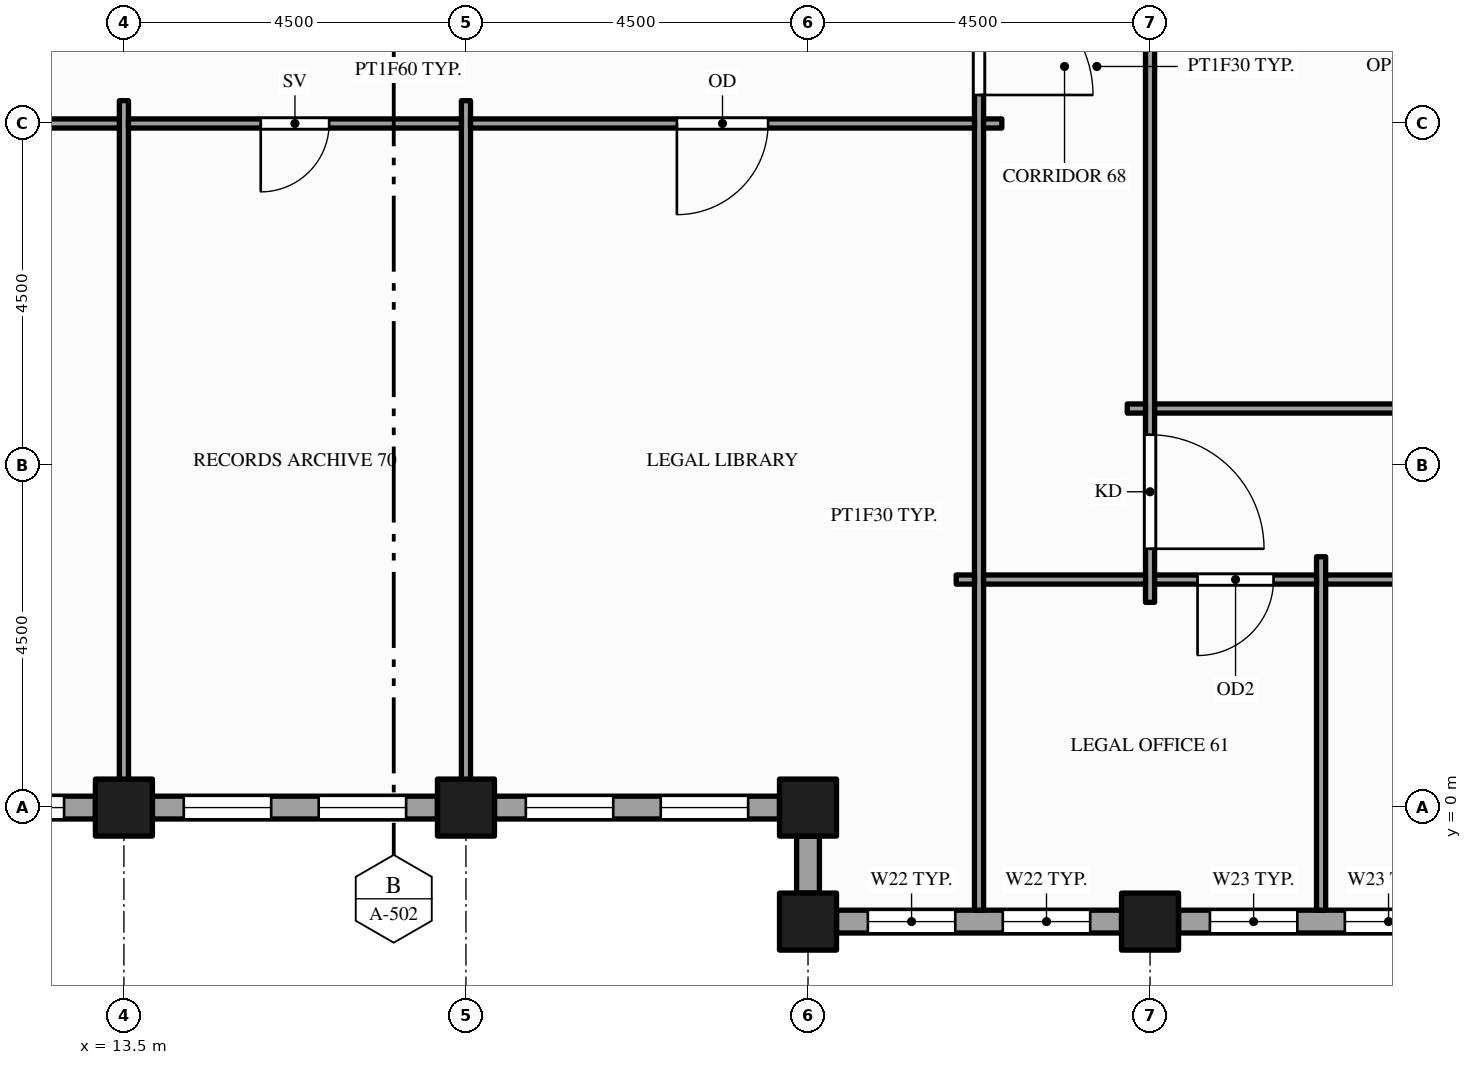
"""IFC4 building model, lengths in metres.
Left out: names, types, materials, properties, quantities, classifications, styles, units other than length and angle.
Written with IfcOpenShell. Run it as: python <this file> out.ifc"""

import sys

from ifc_helpers import new_model, si_unit, direction, frame, frame_2d, origin, origin_2d, place, context, subcontext, project, spatial, rectangle, hollow_rectangle, extrude, element, fill, save


model = new_model("IFC4")
c1 = context("Model", 3, precision=1e-05, world=origin(), true_north=direction((0.0, 1.0)))
c2 = subcontext(c1, "Body", "Model", "MODEL_VIEW")
j1 = project(units=[si_unit("LENGTHUNIT", "METRE"), si_unit("PLANEANGLEUNIT", "RADIAN")], contexts=[c1])
p1 = place(None, origin())
s1 = spatial("IfcSite", under=j1, at=p1, CompositionType="ELEMENT")
p2 = place(p1, origin())
s2 = spatial("IfcBuilding", under=s1, at=p2, CompositionType="ELEMENT")
p3 = place(p2, frame((0.0, 0.0, 199.0)))
s3 = spatial("IfcBuildingStorey", under=s2, at=p3, CompositionType="ELEMENT", Elevation=199.0)
for number, where, z_axis, x_axis in (
    (1, (13.5, 0.0, -0.15), (0.0, 0.0, 1.0), (1.0, 0.0, 0.0)),
    (2, (18.0, 0.0, -0.15), (0.0, 0.0, 1.0), (1.0, 0.0, 0.0)),
    (3, (22.5, -1.5, -0.15), (0.0, 0.0, 1.0), (1.0, 0.0, 0.0)),
    (4, (22.5, 0.0, -0.15), (0.0, 0.0, 1.0), (1.0, 0.0, 0.0)),
    (5, (27.0, -1.5, -0.15), (0.0, 0.0, 1.0), (1.0, 0.0, 0.0)),
):
    element("IfcColumn", number, at=place(p3, frame(where, z_axis=z_axis, x_axis=x_axis)), inside=s3, PredefinedType="COLUMN", context=c2, shape_type="SweptSolid", body=[
        extrude(hollow_rectangle(XDim=0.75, YDim=0.75, WallThickness=0.036, at=origin_2d()), origin(), (0.0, 0.0, 1.0), 4.0),
    ])
p4 = place(p3, frame((22.875, -1.5, 0.0), z_axis=(0.0, 0.0, 1.0), x_axis=(1.0, 0.0, 0.0)))
e6 = element("IfcWall", 6, at=p4, inside=s3, PredefinedType="STANDARD", context=c2, shape_type="SweptSolid", body=[
    extrude(rectangle(XDim=3.75, YDim=0.3, at=frame_2d((1.875, 0.0))), origin(), (0.0, 0.0, 1.0), 2.76),
])
p5 = place(p4, frame((0.413, 0.0, 0.9)))
e7 = element("IfcOpeningElement", 7, at=p5, cuts=e6, PredefinedType="OPENING", context=c2, shape_type="SweptSolid", body=[
    extrude(rectangle(XDim=1.15, YDim=1.5, at=frame_2d((0.575, 0.75))), frame((0.0, 0.16, 0.0), z_axis=(0.0, -1.0, 0.0), x_axis=(1.0, 0.0, 0.0)), (0.0, 0.0, 1.0), 0.32),
])
p6 = place(p4, frame((2.188, 0.0, 0.9)))
e8 = element("IfcOpeningElement", 8, at=p6, cuts=e6, PredefinedType="OPENING", context=c2, shape_type="SweptSolid", body=[
    extrude(rectangle(XDim=1.15, YDim=1.5, at=frame_2d((0.575, 0.75))), frame((0.0, 0.16, 0.0), z_axis=(0.0, -1.0, 0.0), x_axis=(1.0, 0.0, 0.0)), (0.0, 0.0, 1.0), 0.32),
])
p7 = place(p3, frame((27.375, -1.5, 0.0), z_axis=(0.0, 0.0, 1.0), x_axis=(1.0, 0.0, 0.0)))
e9 = element("IfcWall", 9, at=p7, inside=s3, PredefinedType="STANDARD", context=c2, shape_type="SweptSolid", body=[
    extrude(rectangle(XDim=3.75, YDim=0.3, at=frame_2d((1.875, 0.0))), origin(), (0.0, 0.0, 1.0), 2.87),
])
p8 = place(p7, frame((0.413, 0.0, 0.9)))
e10 = element("IfcOpeningElement", 10, at=p8, cuts=e9, PredefinedType="OPENING", context=c2, shape_type="SweptSolid", body=[
    extrude(rectangle(XDim=1.15, YDim=1.75, at=frame_2d((0.575, 0.875))), frame((0.0, 0.16, 0.0), z_axis=(0.0, -1.0, 0.0), x_axis=(1.0, 0.0, 0.0)), (0.0, 0.0, 1.0), 0.32),
])
p9 = place(p7, frame((2.188, 0.0, 0.9)))
e11 = element("IfcOpeningElement", 11, at=p9, cuts=e9, PredefinedType="OPENING", context=c2, shape_type="SweptSolid", body=[
    extrude(rectangle(XDim=1.15, YDim=1.75, at=frame_2d((0.575, 0.875))), frame((0.0, 0.16, 0.0), z_axis=(0.0, -1.0, 0.0), x_axis=(1.0, 0.0, 0.0)), (0.0, 0.0, 1.0), 0.32),
])
p10 = place(p3, frame((9.375, 0.0, 0.0), z_axis=(0.0, 0.0, 1.0), x_axis=(1.0, 0.0, 0.0)))
e12 = element("IfcWall", 12, at=p10, inside=s3, PredefinedType="STANDARD", context=c2, shape_type="SweptSolid", body=[
    extrude(rectangle(XDim=3.75, YDim=0.3, at=frame_2d((1.875, 0.0))), origin(), (0.0, 0.0, 1.0), 2.87),
])
p11 = place(p10, frame((0.413, 0.0, 0.9)))
e13 = element("IfcOpeningElement", 13, at=p11, cuts=e12, PredefinedType="OPENING", context=c2, shape_type="SweptSolid", body=[
    extrude(rectangle(XDim=1.15, YDim=1.75, at=frame_2d((0.575, 0.875))), frame((0.0, 0.16, 0.0), z_axis=(0.0, -1.0, 0.0), x_axis=(1.0, 0.0, 0.0)), (0.0, 0.0, 1.0), 0.32),
])
p12 = place(p10, frame((2.188, 0.0, 0.9)))
e14 = element("IfcOpeningElement", 14, at=p12, cuts=e12, PredefinedType="OPENING", context=c2, shape_type="SweptSolid", body=[
    extrude(rectangle(XDim=1.15, YDim=1.75, at=frame_2d((0.575, 0.875))), frame((0.0, 0.16, 0.0), z_axis=(0.0, -1.0, 0.0), x_axis=(1.0, 0.0, 0.0)), (0.0, 0.0, 1.0), 0.32),
])
p13 = place(p3, frame((13.875, 0.0, 0.0), z_axis=(0.0, 0.0, 1.0), x_axis=(1.0, 0.0, 0.0)))
e15 = element("IfcWall", 15, at=p13, inside=s3, PredefinedType="STANDARD", context=c2, shape_type="SweptSolid", body=[
    extrude(rectangle(XDim=3.75, YDim=0.3, at=frame_2d((1.875, 0.0))), origin(), (0.0, 0.0, 1.0), 2.87),
])
p14 = place(p13, frame((0.413, 0.0, 0.9)))
e16 = element("IfcOpeningElement", 16, at=p14, cuts=e15, PredefinedType="OPENING", context=c2, shape_type="SweptSolid", body=[
    extrude(rectangle(XDim=1.15, YDim=1.75, at=frame_2d((0.575, 0.875))), frame((0.0, 0.16, 0.0), z_axis=(0.0, -1.0, 0.0), x_axis=(1.0, 0.0, 0.0)), (0.0, 0.0, 1.0), 0.32),
])
p15 = place(p13, frame((2.188, 0.0, 0.9)))
e17 = element("IfcOpeningElement", 17, at=p15, cuts=e15, PredefinedType="OPENING", context=c2, shape_type="SweptSolid", body=[
    extrude(rectangle(XDim=1.15, YDim=1.75, at=frame_2d((0.575, 0.875))), frame((0.0, 0.16, 0.0), z_axis=(0.0, -1.0, 0.0), x_axis=(1.0, 0.0, 0.0)), (0.0, 0.0, 1.0), 0.32),
])
p16 = place(p3, frame((18.375, 0.0, 0.0), z_axis=(0.0, 0.0, 1.0), x_axis=(1.0, 0.0, 0.0)))
e18 = element("IfcWall", 18, at=p16, inside=s3, PredefinedType="STANDARD", context=c2, shape_type="SweptSolid", body=[
    extrude(rectangle(XDim=3.75, YDim=0.3, at=frame_2d((1.875, 0.0))), origin(), (0.0, 0.0, 1.0), 2.87),
])
p17 = place(p16, frame((0.413, 0.0, 0.9)))
e19 = element("IfcOpeningElement", 19, at=p17, cuts=e18, PredefinedType="OPENING", context=c2, shape_type="SweptSolid", body=[
    extrude(rectangle(XDim=1.15, YDim=1.75, at=frame_2d((0.575, 0.875))), frame((0.0, 0.16, 0.0), z_axis=(0.0, -1.0, 0.0), x_axis=(1.0, 0.0, 0.0)), (0.0, 0.0, 1.0), 0.32),
])
p18 = place(p16, frame((2.188, 0.0, 0.9)))
e20 = element("IfcOpeningElement", 20, at=p18, cuts=e18, PredefinedType="OPENING", context=c2, shape_type="SweptSolid", body=[
    extrude(rectangle(XDim=1.15, YDim=1.75, at=frame_2d((0.575, 0.875))), frame((0.0, 0.16, 0.0), z_axis=(0.0, -1.0, 0.0), x_axis=(1.0, 0.0, 0.0)), (0.0, 0.0, 1.0), 0.32),
])
p19 = place(p3, frame((22.5, -0.375, 0.0), z_axis=(0.0, 0.0, 1.0), x_axis=(0.0, -1.0, 0.0)))
e21 = element("IfcWall", 21, at=p19, inside=s3, PredefinedType="STANDARD", context=c2, shape_type="SweptSolid", body=[
    extrude(rectangle(XDim=0.75, YDim=0.3, at=frame_2d((0.375, 0.0))), origin(), (0.0, 0.0, 1.0), 3.157),
])
for number, where, z_axis, x_axis in (
    (22, (13.5, 0.15, 0.0), (0.0, 0.0, 1.0), (0.0, 1.0, 0.0)),
    (23, (18.0, 0.15, 0.0), (0.0, 0.0, 1.0), (0.0, 1.0, 0.0)),
):
    element("IfcWall", number, at=place(p3, frame(where, z_axis=z_axis, x_axis=x_axis)), inside=s3, PredefinedType="PARTITIONING", context=c2, shape_type="SweptSolid", body=[
        extrude(rectangle(XDim=9.15, YDim=0.12, at=frame_2d((4.575, 0.0))), origin(), (0.0, 0.0, 1.0), 2.87),
    ])
p20 = place(p3, frame((24.75, -1.35, 0.0), z_axis=(0.0, 0.0, 1.0), x_axis=(0.0, 1.0, 0.0)))
e24 = element("IfcWall", 24, at=p20, inside=s3, PredefinedType="PARTITIONING", context=c2, shape_type="SweptSolid", body=[
    extrude(rectangle(XDim=24.101, YDim=0.12, at=frame_2d((12.05, 0.0))), origin(), (0.0, 0.0, 1.0), 2.76),
])
p21 = place(p20, frame((10.725, 0.0, 0.0)))
e25 = element("IfcOpeningElement", 25, at=p21, cuts=e24, PredefinedType="OPENING", context=c2, shape_type="SweptSolid", body=[
    extrude(rectangle(XDim=1.5, YDim=2.1, at=frame_2d((0.75, 1.05))), frame((0.0, 0.07, 0.0), z_axis=(0.0, -1.0, 0.0), x_axis=(1.0, 0.0, 0.0)), (0.0, 0.0, 1.0), 0.14),
])
p22 = place(p20, frame((14.625, 0.0, 0.0)))
e26 = element("IfcOpeningElement", 26, at=p22, cuts=e24, PredefinedType="OPENING", context=c2, shape_type="SweptSolid", body=[
    extrude(rectangle(XDim=1.2, YDim=2.1, at=frame_2d((0.6, 1.05))), frame((0.0, 0.07, 0.0), z_axis=(0.0, -1.0, 0.0), x_axis=(1.0, 0.0, 0.0)), (0.0, 0.0, 1.0), 0.14),
])
p23 = place(p3, frame((27.0, 2.7, 0.0), z_axis=(0.0, 0.0, 1.0), x_axis=(0.0, 1.0, 0.0)))
e27 = element("IfcWall", 27, at=p23, inside=s3, PredefinedType="PARTITIONING", context=c2, shape_type="SweptSolid", body=[
    extrude(rectangle(XDim=14.1, YDim=0.12, at=frame_2d((7.05, 0.0))), origin(), (0.0, 0.0, 1.0), 2.87),
])
p24 = place(p23, frame((0.705, 0.0, 0.0)))
e28 = element("IfcOpeningElement", 28, at=p24, cuts=e27, PredefinedType="OPENING", context=c2, shape_type="SweptSolid", body=[
    extrude(rectangle(XDim=1.5, YDim=2.1, at=frame_2d((0.75, 1.05))), frame((0.0, 0.07, 0.0), z_axis=(0.0, -1.0, 0.0), x_axis=(1.0, 0.0, 0.0)), (0.0, 0.0, 1.0), 0.14),
])
p25 = place(p23, frame((11.895, 0.0, 0.0)))
e29 = element("IfcOpeningElement", 29, at=p25, cuts=e27, PredefinedType="OPENING", context=c2, shape_type="SweptSolid", body=[
    extrude(rectangle(XDim=1.5, YDim=2.1, at=frame_2d((0.75, 1.05))), frame((0.0, 0.07, 0.0), z_axis=(0.0, -1.0, 0.0), x_axis=(1.0, 0.0, 0.0)), (0.0, 0.0, 1.0), 0.14),
])
p26 = place(p3, frame((29.25, -1.35, 0.0), z_axis=(0.0, 0.0, 1.0), x_axis=(0.0, 1.0, 0.0)))
e30 = element("IfcWall", 30, at=p26, inside=s3, PredefinedType="PARTITIONING", context=c2, shape_type="SweptSolid", body=[
    extrude(rectangle(XDim=4.65, YDim=0.12, at=frame_2d((2.325, 0.0))), origin(), (0.0, 0.0, 1.0), 2.87),
])
p27 = place(p3, frame((24.45, 3.0, 0.0), z_axis=(0.0, 0.0, 1.0), x_axis=(1.0, 0.0, 0.0)))
e31 = element("IfcWall", 31, at=p27, inside=s3, PredefinedType="PARTITIONING", context=c2, shape_type="SweptSolid", body=[
    extrude(rectangle(XDim=0.24, YDim=0.12, at=frame_2d((0.12, 0.0))), origin(), (0.0, 0.0, 1.0), 2.76),
])
p28 = place(p3, frame((24.81, 3.0, 0.0), z_axis=(0.0, 0.0, 1.0), x_axis=(1.0, 0.0, 0.0)))
e32 = element("IfcWall", 32, at=p28, inside=s3, PredefinedType="PARTITIONING", context=c2, shape_type="SweptSolid", body=[
    extrude(rectangle(XDim=2.13, YDim=0.12, at=frame_2d((1.065, 0.0))), origin(), (0.0, 0.0, 1.0), 2.76),
])
p29 = place(p3, frame((27.06, 3.0, 0.0), z_axis=(0.0, 0.0, 1.0), x_axis=(1.0, 0.0, 0.0)))
e33 = element("IfcWall", 33, at=p29, inside=s3, PredefinedType="PARTITIONING", context=c2, shape_type="SweptSolid", body=[
    extrude(rectangle(XDim=2.13, YDim=0.12, at=frame_2d((1.065, 0.0))), origin(), (0.0, 0.0, 1.0), 2.87),
])
p30 = place(p29, frame((0.565, 0.0, 0.0)))
e34 = element("IfcOpeningElement", 34, at=p30, cuts=e33, PredefinedType="OPENING", context=c2, shape_type="SweptSolid", body=[
    extrude(rectangle(XDim=1.0, YDim=2.1, at=frame_2d((0.5, 1.05))), frame((0.0, 0.07, 0.0), z_axis=(0.0, -1.0, 0.0), x_axis=(1.0, 0.0, 0.0)), (0.0, 0.0, 1.0), 0.14),
])
p31 = place(p3, frame((29.31, 3.0, 0.0), z_axis=(0.0, 0.0, 1.0), x_axis=(1.0, 0.0, 0.0)))
e35 = element("IfcWall", 35, at=p31, inside=s3, PredefinedType="PARTITIONING", context=c2, shape_type="SweptSolid", body=[
    extrude(rectangle(XDim=4.38, YDim=0.12, at=frame_2d((2.19, 0.0))), origin(), (0.0, 0.0, 1.0), 2.87),
])
p32 = place(p31, frame((1.69, 0.0, 0.0)))
e36 = element("IfcOpeningElement", 36, at=p32, cuts=e35, PredefinedType="OPENING", context=c2, shape_type="SweptSolid", body=[
    extrude(rectangle(XDim=1.0, YDim=2.1, at=frame_2d((0.5, 1.05))), frame((0.0, 0.07, 0.0), z_axis=(0.0, -1.0, 0.0), x_axis=(1.0, 0.0, 0.0)), (0.0, 0.0, 1.0), 0.14),
])
p33 = place(p3, frame((26.7, 5.25, 0.0), z_axis=(0.0, 0.0, 1.0), x_axis=(1.0, 0.0, 0.0)))
e37 = element("IfcWall", 37, at=p33, inside=s3, PredefinedType="PARTITIONING", context=c2, shape_type="SweptSolid", body=[
    extrude(rectangle(XDim=0.24, YDim=0.12, at=frame_2d((0.12, 0.0))), origin(), (0.0, 0.0, 1.0), 2.87),
])
p34 = place(p3, frame((27.06, 5.25, 0.0), z_axis=(0.0, 0.0, 1.0), x_axis=(1.0, 0.0, 0.0)))
e38 = element("IfcWall", 38, at=p34, inside=s3, PredefinedType="PARTITIONING", context=c2, shape_type="SweptSolid", body=[
    extrude(rectangle(XDim=8.88, YDim=0.12, at=frame_2d((4.44, 0.0))), origin(), (0.0, 0.0, 1.0), 2.87),
])
p35 = place(p34, frame((3.54, 0.0, 0.0)))
e39 = element("IfcOpeningElement", 39, at=p35, cuts=e38, PredefinedType="OPENING", context=c2, shape_type="SweptSolid", body=[
    extrude(rectangle(XDim=1.8, YDim=2.1, at=frame_2d((0.9, 1.05))), frame((0.0, 0.07, 0.0), z_axis=(0.0, -1.0, 0.0), x_axis=(1.0, 0.0, 0.0)), (0.0, 0.0, 1.0), 0.14),
])
p36 = place(p3, frame((9.06, 9.0, 0.0), z_axis=(0.0, 0.0, 1.0), x_axis=(1.0, 0.0, 0.0)))
e40 = element("IfcWall", 40, at=p36, inside=s3, PredefinedType="PARTITIONING", context=c2, shape_type="SweptSolid", body=[
    extrude(rectangle(XDim=4.38, YDim=0.12, at=frame_2d((2.19, 0.0))), origin(), (0.0, 0.0, 1.0), 2.87),
])
p37 = place(p36, frame((1.69, 0.0, 0.0)))
e41 = element("IfcOpeningElement", 41, at=p37, cuts=e40, PredefinedType="OPENING", context=c2, shape_type="SweptSolid", body=[
    extrude(rectangle(XDim=1.0, YDim=2.1, at=frame_2d((0.5, 1.05))), frame((0.0, 0.07, 0.0), z_axis=(0.0, -1.0, 0.0), x_axis=(1.0, 0.0, 0.0)), (0.0, 0.0, 1.0), 0.14),
])
p38 = place(p3, frame((13.56, 9.0, 0.0), z_axis=(0.0, 0.0, 1.0), x_axis=(1.0, 0.0, 0.0)))
e42 = element("IfcWall", 42, at=p38, inside=s3, PredefinedType="PARTITIONING", context=c2, shape_type="SweptSolid", body=[
    extrude(rectangle(XDim=4.38, YDim=0.12, at=frame_2d((2.19, 0.0))), origin(), (0.0, 0.0, 1.0), 2.87),
])
p39 = place(p38, frame((1.74, 0.0, 0.0)))
e43 = element("IfcOpeningElement", 43, at=p39, cuts=e42, PredefinedType="OPENING", context=c2, shape_type="SweptSolid", body=[
    extrude(rectangle(XDim=0.9, YDim=2.1, at=frame_2d((0.45, 1.05))), frame((0.0, 0.07, 0.0), z_axis=(0.0, -1.0, 0.0), x_axis=(1.0, 0.0, 0.0)), (0.0, 0.0, 1.0), 0.14),
])
p40 = place(p3, frame((18.06, 9.0, 0.0), z_axis=(0.0, 0.0, 1.0), x_axis=(1.0, 0.0, 0.0)))
e44 = element("IfcWall", 44, at=p40, inside=s3, PredefinedType="PARTITIONING", context=c2, shape_type="SweptSolid", body=[
    extrude(rectangle(XDim=6.63, YDim=0.12, at=frame_2d((3.315, 0.0))), origin(), (0.0, 0.0, 1.0), 2.76),
])
p41 = place(p40, frame((2.715, 0.0, 0.0)))
e45 = element("IfcOpeningElement", 45, at=p41, cuts=e44, PredefinedType="OPENING", context=c2, shape_type="SweptSolid", body=[
    extrude(rectangle(XDim=1.2, YDim=2.1, at=frame_2d((0.6, 1.05))), frame((0.0, 0.07, 0.0), z_axis=(0.0, -1.0, 0.0), x_axis=(1.0, 0.0, 0.0)), (0.0, 0.0, 1.0), 0.14),
])
p42 = place(p3, frame((24.81, 9.0, 0.0), z_axis=(0.0, 0.0, 1.0), x_axis=(1.0, 0.0, 0.0)))
e46 = element("IfcWall", 46, at=p42, inside=s3, PredefinedType="PARTITIONING", context=c2, shape_type="SweptSolid", body=[
    extrude(rectangle(XDim=0.24, YDim=0.12, at=frame_2d((0.12, 0.0))), origin(), (0.0, 0.0, 1.0), 2.76),
])
p43 = place(p5, origin())
e47 = element("IfcWindow", 47, at=p43, inside=s3, PartitioningType="SINGLE_PANEL", PredefinedType="WINDOW", context=c2, shape_type="SweptSolid", body=[
    extrude(rectangle(XDim=1.15, YDim=1.5, at=frame_2d((0.575, 0.75))), frame((0.0, 0.03, 0.0), z_axis=(0.0, -1.0, 0.0), x_axis=(1.0, 0.0, 0.0)), (0.0, 0.0, 1.0), 0.06),
])
fill(e7, e47)
p44 = place(p6, origin())
e48 = element("IfcWindow", 48, at=p44, inside=s3, PartitioningType="SINGLE_PANEL", PredefinedType="WINDOW", context=c2, shape_type="SweptSolid", body=[
    extrude(rectangle(XDim=1.15, YDim=1.5, at=frame_2d((0.575, 0.75))), frame((0.0, 0.03, 0.0), z_axis=(0.0, -1.0, 0.0), x_axis=(1.0, 0.0, 0.0)), (0.0, 0.0, 1.0), 0.06),
])
fill(e8, e48)
p45 = place(p8, origin())
e49 = element("IfcWindow", 49, at=p45, inside=s3, PartitioningType="SINGLE_PANEL", PredefinedType="WINDOW", context=c2, shape_type="SweptSolid", body=[
    extrude(rectangle(XDim=1.15, YDim=1.75, at=frame_2d((0.575, 0.875))), frame((0.0, 0.03, 0.0), z_axis=(0.0, -1.0, 0.0), x_axis=(1.0, 0.0, 0.0)), (0.0, 0.0, 1.0), 0.06),
])
fill(e10, e49)
p46 = place(p9, origin())
e50 = element("IfcWindow", 50, at=p46, inside=s3, PartitioningType="SINGLE_PANEL", PredefinedType="WINDOW", context=c2, shape_type="SweptSolid", body=[
    extrude(rectangle(XDim=1.15, YDim=1.75, at=frame_2d((0.575, 0.875))), frame((0.0, 0.03, 0.0), z_axis=(0.0, -1.0, 0.0), x_axis=(1.0, 0.0, 0.0)), (0.0, 0.0, 1.0), 0.06),
])
fill(e11, e50)
p47 = place(p12, origin())
e51 = element("IfcWindow", 51, at=p47, inside=s3, PartitioningType="SINGLE_PANEL", PredefinedType="WINDOW", context=c2, shape_type="SweptSolid", body=[
    extrude(rectangle(XDim=1.15, YDim=1.75, at=frame_2d((0.575, 0.875))), frame((0.0, 0.03, 0.0), z_axis=(0.0, -1.0, 0.0), x_axis=(1.0, 0.0, 0.0)), (0.0, 0.0, 1.0), 0.06),
])
fill(e14, e51)
p48 = place(p14, origin())
e52 = element("IfcWindow", 52, at=p48, inside=s3, PartitioningType="SINGLE_PANEL", PredefinedType="WINDOW", context=c2, shape_type="SweptSolid", body=[
    extrude(rectangle(XDim=1.15, YDim=1.75, at=frame_2d((0.575, 0.875))), frame((0.0, 0.03, 0.0), z_axis=(0.0, -1.0, 0.0), x_axis=(1.0, 0.0, 0.0)), (0.0, 0.0, 1.0), 0.06),
])
fill(e16, e52)
p49 = place(p15, origin())
e53 = element("IfcWindow", 53, at=p49, inside=s3, PartitioningType="SINGLE_PANEL", PredefinedType="WINDOW", context=c2, shape_type="SweptSolid", body=[
    extrude(rectangle(XDim=1.15, YDim=1.75, at=frame_2d((0.575, 0.875))), frame((0.0, 0.03, 0.0), z_axis=(0.0, -1.0, 0.0), x_axis=(1.0, 0.0, 0.0)), (0.0, 0.0, 1.0), 0.06),
])
fill(e17, e53)
p50 = place(p17, origin())
e54 = element("IfcWindow", 54, at=p50, inside=s3, PartitioningType="SINGLE_PANEL", PredefinedType="WINDOW", context=c2, shape_type="SweptSolid", body=[
    extrude(rectangle(XDim=1.15, YDim=1.75, at=frame_2d((0.575, 0.875))), frame((0.0, 0.03, 0.0), z_axis=(0.0, -1.0, 0.0), x_axis=(1.0, 0.0, 0.0)), (0.0, 0.0, 1.0), 0.06),
])
fill(e19, e54)
p51 = place(p18, origin())
e55 = element("IfcWindow", 55, at=p51, inside=s3, PartitioningType="SINGLE_PANEL", PredefinedType="WINDOW", context=c2, shape_type="SweptSolid", body=[
    extrude(rectangle(XDim=1.15, YDim=1.75, at=frame_2d((0.575, 0.875))), frame((0.0, 0.03, 0.0), z_axis=(0.0, -1.0, 0.0), x_axis=(1.0, 0.0, 0.0)), (0.0, 0.0, 1.0), 0.06),
])
fill(e20, e55)
p52 = place(p21, origin())
e56 = element("IfcDoor", 56, at=p52, inside=s3, OperationType="SINGLE_SWING_LEFT", PredefinedType="DOOR", context=c2, shape_type="SweptSolid", body=[
    extrude(rectangle(XDim=1.5, YDim=2.1, at=frame_2d((0.75, 1.05))), frame((0.0, 0.025, 0.0), z_axis=(0.0, -1.0, 0.0), x_axis=(1.0, 0.0, 0.0)), (0.0, 0.0, 1.0), 0.05),
])
fill(e25, e56)
p53 = place(p24, origin())
e57 = element("IfcDoor", 57, at=p53, inside=s3, OperationType="SINGLE_SWING_LEFT", PredefinedType="DOOR", context=c2, shape_type="SweptSolid", body=[
    extrude(rectangle(XDim=1.5, YDim=2.1, at=frame_2d((0.75, 1.05))), frame((0.0, 0.025, 0.0), z_axis=(0.0, -1.0, 0.0), x_axis=(1.0, 0.0, 0.0)), (0.0, 0.0, 1.0), 0.05),
])
fill(e28, e57)
p54 = place(p39, origin())
e58 = element("IfcDoor", 58, at=p54, inside=s3, OperationType="SINGLE_SWING_LEFT", PredefinedType="DOOR", context=c2, shape_type="SweptSolid", body=[
    extrude(rectangle(XDim=0.9, YDim=2.1, at=frame_2d((0.45, 1.05))), frame((0.0, 0.025, 0.0), z_axis=(0.0, -1.0, 0.0), x_axis=(1.0, 0.0, 0.0)), (0.0, 0.0, 1.0), 0.05),
])
fill(e43, e58)
p55 = place(p41, origin())
e59 = element("IfcDoor", 59, at=p55, inside=s3, OperationType="SINGLE_SWING_LEFT", PredefinedType="DOOR", context=c2, shape_type="SweptSolid", body=[
    extrude(rectangle(XDim=1.2, YDim=2.1, at=frame_2d((0.6, 1.05))), frame((0.0, 0.025, 0.0), z_axis=(0.0, -1.0, 0.0), x_axis=(1.0, 0.0, 0.0)), (0.0, 0.0, 1.0), 0.05),
])
fill(e45, e59)
p56 = place(p30, origin())
e60 = element("IfcDoor", 60, at=p56, inside=s3, OperationType="SINGLE_SWING_LEFT", PredefinedType="DOOR", context=c2, shape_type="SweptSolid", body=[
    extrude(rectangle(XDim=1.0, YDim=2.1, at=frame_2d((0.5, 1.05))), frame((0.0, 0.025, 0.0), z_axis=(0.0, -1.0, 0.0), x_axis=(1.0, 0.0, 0.0)), (0.0, 0.0, 1.0), 0.05),
])
fill(e34, e60)
save(model, sys.argv[1])
